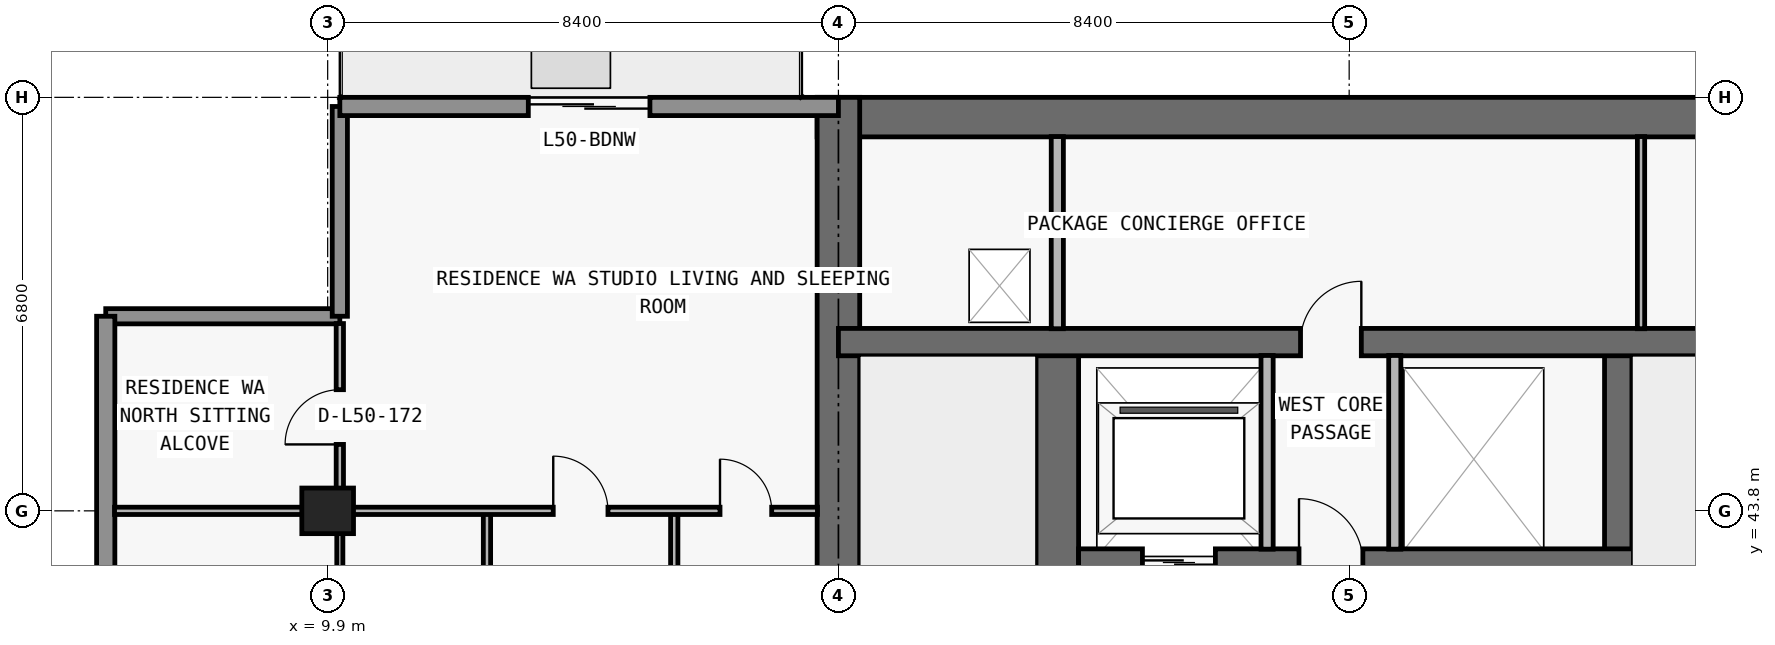
"""IFC4 building model, lengths in metres.
Left out: names, types, materials, properties, quantities, classifications, styles, units other than length and angle.
Written with IfcOpenShell. Run it as: python <this file> out.ifc"""

import sys

from ifc_helpers import new_model, si_unit, direction, frame, frame_2d, origin, origin_2d, place, context, subcontext, project, spatial, rectangle, extrude, element, fill, save


model = new_model("IFC4")
c1 = context("Model", 3, precision=1e-05, world=origin(), true_north=direction((0.0, 1.0)))
c2 = subcontext(c1, "Body", "Model", "MODEL_VIEW")
j1 = project(units=[si_unit("LENGTHUNIT", "METRE"), si_unit("PLANEANGLEUNIT", "RADIAN")], contexts=[c1])
p1 = place(None, origin())
s1 = spatial("IfcSite", under=j1, at=p1, CompositionType="ELEMENT")
p2 = place(p1, origin())
s2 = spatial("IfcBuilding", under=s1, at=p2, CompositionType="ELEMENT")
p3 = place(p2, frame((0.0, 0.0, 180.3)))
s3 = spatial("IfcBuildingStorey", under=s2, at=p3, CompositionType="ELEMENT", Elevation=180.3)
p4 = place(p3, frame((9.9, 43.8, 0.0), z_axis=(0.0, 0.0, 1.0), x_axis=(1.0, 0.0, 0.0)))
e1 = element("IfcColumn", 1, at=p4, inside=s3, PredefinedType="COLUMN", context=c2, shape_type="SweptSolid", body=[
    extrude(rectangle(XDim=0.85, YDim=0.75, at=origin_2d()), origin(), (0.0, 0.0, 1.0), 3.0),
])
p5 = place(p3, frame((17.95, 50.275, 0.0), z_axis=(0.0, 0.0, 1.0), x_axis=(1.0, 0.0, 0.0)))
e2 = element("IfcWall", 2, at=p5, inside=s3, PredefinedType="SHEAR", context=c2, shape_type="SweptSolid", body=[
    extrude(rectangle(XDim=41.9, YDim=0.65, at=frame_2d((20.95, 0.0))), origin(), (0.0, 0.0, 1.0), 3.0),
])
p6 = place(p3, frame((18.3, 36.65, 0.0), z_axis=(0.0, 0.0, 1.0), x_axis=(0.0, 1.0, 0.0)))
e3 = element("IfcWall", 3, at=p6, inside=s3, PredefinedType="SHEAR", context=c2, shape_type="SweptSolid", body=[
    extrude(rectangle(XDim=13.95, YDim=0.7, at=frame_2d((6.975, 0.0))), origin(), (0.0, 0.0, 1.0), 3.0),
])
p7 = place(p3, frame((21.9, 37.0, 0.0), z_axis=(0.0, 0.0, 1.0), x_axis=(0.0, 1.0, 0.0)))
e4 = element("IfcWall", 4, at=p7, inside=s3, PredefinedType="SHEAR", context=c2, shape_type="SweptSolid", body=[
    extrude(rectangle(XDim=9.575, YDim=0.7, at=frame_2d((4.788, 0.0))), origin(), (0.0, 0.0, 1.0), 3.0),
])
p8 = place(p7, frame((0.55, 0.0, 0.0)))
e5 = element("IfcOpeningElement", 5, at=p8, cuts=e4, PredefinedType="OPENING", context=c2, shape_type="SweptSolid", body=[
    extrude(rectangle(XDim=1.1, YDim=2.15, at=frame_2d((0.55, 1.075))), frame((0.0, 0.36, 0.0), z_axis=(0.0, -1.0, 0.0), x_axis=(1.0, 0.0, 0.0)), (0.0, 0.0, 1.0), 0.72),
])
p9 = place(p3, frame((31.125, 37.0, 0.0), z_axis=(0.0, 0.0, 1.0), x_axis=(0.0, 1.0, 0.0)))
e6 = element("IfcWall", 6, at=p9, inside=s3, PredefinedType="SHEAR", context=c2, shape_type="SweptSolid", body=[
    extrude(rectangle(XDim=9.575, YDim=0.45, at=frame_2d((4.788, 0.0))), origin(), (0.0, 0.0, 1.0), 3.0),
])
p10 = place(p3, frame((22.25, 42.95, 0.0), z_axis=(0.0, 0.0, 1.0), x_axis=(1.0, 0.0, 0.0)))
e7 = element("IfcWall", 7, at=p10, inside=s3, PredefinedType="SHEAR", context=c2, shape_type="SweptSolid", body=[
    extrude(rectangle(XDim=33.3, YDim=0.45, at=frame_2d((16.65, 0.0))), origin(), (0.0, 0.0, 1.0), 3.0),
])
p11 = place(p10, frame((1.05, 0.0, 0.0)))
e8 = element("IfcOpeningElement", 8, at=p11, cuts=e7, PredefinedType="OPENING", context=c2, shape_type="SweptSolid", body=[
    extrude(rectangle(XDim=1.2, YDim=2.2, at=frame_2d((0.6, 1.1))), frame((0.0, 0.235, 0.0), z_axis=(0.0, -1.0, 0.0), x_axis=(1.0, 0.0, 0.0)), (0.0, 0.0, 1.0), 0.47),
])
p12 = place(p10, frame((31.05, 0.0, 0.0)))
e9 = element("IfcOpeningElement", 9, at=p12, cuts=e7, PredefinedType="OPENING", context=c2, shape_type="SweptSolid", body=[
    extrude(rectangle(XDim=1.2, YDim=2.2, at=frame_2d((0.6, 1.1))), frame((0.0, 0.235, 0.0), z_axis=(0.0, -1.0, 0.0), x_axis=(1.0, 0.0, 0.0)), (0.0, 0.0, 1.0), 0.47),
])
p13 = place(p10, frame((21.4, 0.0, 0.0)))
e10 = element("IfcOpeningElement", 10, at=p13, cuts=e7, PredefinedType="OPENING", context=c2, shape_type="SweptSolid", body=[
    extrude(rectangle(XDim=1.1, YDim=2.2, at=frame_2d((0.55, 1.1))), frame((0.0, 0.235, 0.0), z_axis=(0.0, -1.0, 0.0), x_axis=(1.0, 0.0, 0.0)), (0.0, 0.0, 1.0), 0.47),
])
p14 = place(p10, frame((24.0, 0.0, 0.0)))
e11 = element("IfcOpeningElement", 11, at=p14, cuts=e7, PredefinedType="OPENING", context=c2, shape_type="SweptSolid", body=[
    extrude(rectangle(XDim=1.1, YDim=2.2, at=frame_2d((0.55, 1.1))), frame((0.0, 0.235, 0.0), z_axis=(0.0, -1.0, 0.0), x_axis=(1.0, 0.0, 0.0)), (0.0, 0.0, 1.0), 0.47),
])
p15 = place(p10, frame((3.625, 0.0, 0.0)))
e12 = element("IfcOpeningElement", 12, at=p15, cuts=e7, PredefinedType="OPENING", context=c2, shape_type="SweptSolid", body=[
    extrude(rectangle(XDim=1.05, YDim=2.15, at=frame_2d((0.525, 1.075))), frame((0.0, 0.235, 0.0), z_axis=(0.0, -1.0, 0.0), x_axis=(1.0, 0.0, 0.0)), (0.0, 0.0, 1.0), 0.47),
])
p16 = place(p10, frame((28.675, 0.0, 0.0)))
e13 = element("IfcOpeningElement", 13, at=p16, cuts=e7, PredefinedType="OPENING", context=c2, shape_type="SweptSolid", body=[
    extrude(rectangle(XDim=1.05, YDim=2.15, at=frame_2d((0.525, 1.075))), frame((0.0, 0.235, 0.0), z_axis=(0.0, -1.0, 0.0), x_axis=(1.0, 0.0, 0.0)), (0.0, 0.0, 1.0), 0.47),
])
p17 = place(p10, frame((15.975, 0.0, 0.0)))
e14 = element("IfcOpeningElement", 14, at=p17, cuts=e7, PredefinedType="OPENING", context=c2, shape_type="SweptSolid", body=[
    extrude(rectangle(XDim=1.0, YDim=2.2, at=frame_2d((0.5, 1.1))), frame((0.0, 0.235, 0.0), z_axis=(0.0, -1.0, 0.0), x_axis=(1.0, 0.0, 0.0)), (0.0, 0.0, 1.0), 0.47),
])
p18 = place(p3, frame((18.3, 46.575, 0.0), z_axis=(0.0, 0.0, 1.0), x_axis=(1.0, 0.0, 0.0)))
e15 = element("IfcWall", 15, at=p18, inside=s3, PredefinedType="SHEAR", context=c2, shape_type="SweptSolid", body=[
    extrude(rectangle(XDim=41.2, YDim=0.45, at=frame_2d((20.6, 0.0))), origin(), (0.0, 0.0, 1.0), 3.0),
])
p19 = place(p18, frame((7.6, 0.0, 0.0)))
e16 = element("IfcOpeningElement", 16, at=p19, cuts=e15, PredefinedType="OPENING", context=c2, shape_type="SweptSolid", body=[
    extrude(rectangle(XDim=1.0, YDim=2.2, at=frame_2d((0.5, 1.1))), frame((0.0, 0.235, 0.0), z_axis=(0.0, -1.0, 0.0), x_axis=(1.0, 0.0, 0.0)), (0.0, 0.0, 1.0), 0.47),
])
p20 = place(p18, frame((32.625, 0.0, 0.0)))
e17 = element("IfcOpeningElement", 17, at=p20, cuts=e15, PredefinedType="OPENING", context=c2, shape_type="SweptSolid", body=[
    extrude(rectangle(XDim=1.05, YDim=2.15, at=frame_2d((0.525, 1.075))), frame((0.0, 0.235, 0.0), z_axis=(0.0, -1.0, 0.0), x_axis=(1.0, 0.0, 0.0)), (0.0, 0.0, 1.0), 0.47),
])
p21 = place(p3, frame((6.25, 47.0, 0.0), z_axis=(0.0, 0.0, 1.0), x_axis=(1.0, 0.0, 0.0)))
e18 = element("IfcWall", 18, at=p21, inside=s3, PredefinedType="ELEMENTEDWALL", context=c2, shape_type="SweptSolid", body=[
    extrude(rectangle(XDim=3.85, YDim=0.25, at=frame_2d((1.925, 0.0))), origin(), (0.0, 0.0, 1.0), 3.0),
])
p22 = place(p3, frame((10.1, 47.0, 0.0), z_axis=(0.0, 0.0, 1.0), x_axis=(0.0, 1.0, 0.0)))
e19 = element("IfcWall", 19, at=p22, inside=s3, PredefinedType="ELEMENTEDWALL", context=c2, shape_type="SweptSolid", body=[
    extrude(rectangle(XDim=3.45, YDim=0.25, at=frame_2d((1.725, 0.0))), origin(), (0.0, 0.0, 1.0), 3.0),
])
p23 = place(p3, frame((6.25, 29.1, 0.0), z_axis=(0.0, 0.0, 1.0), x_axis=(0.0, 1.0, 0.0)))
e20 = element("IfcWall", 20, at=p23, inside=s3, PredefinedType="STANDARD", context=c2, shape_type="SweptSolid", body=[
    extrude(rectangle(XDim=17.9, YDim=0.3, at=frame_2d((8.95, 0.0))), origin(), (0.0, 0.0, 1.0), 3.0),
])
p24 = place(p3, frame((10.1, 50.45, 0.0), z_axis=(0.0, 0.0, 1.0), x_axis=(1.0, 0.0, 0.0)))
e21 = element("IfcWall", 21, at=p24, inside=s3, PredefinedType="STANDARD", context=c2, shape_type="SweptSolid", body=[
    extrude(rectangle(XDim=8.2, YDim=0.3, at=frame_2d((4.1, 0.0))), origin(), (0.0, 0.0, 1.0), 3.0),
])
p25 = place(p24, frame((3.1, 0.0, 0.0)))
e22 = element("IfcOpeningElement", 22, at=p25, cuts=e21, PredefinedType="OPENING", context=c2, shape_type="SweptSolid", body=[
    extrude(rectangle(XDim=2.0, YDim=2.3, at=frame_2d((1.0, 1.15))), frame((0.0, 0.16, 0.0), z_axis=(0.0, -1.0, 0.0), x_axis=(1.0, 0.0, 0.0)), (0.0, 0.0, 1.0), 0.32),
])
p26 = place(p3, frame((10.1, 37.0, 0.0), z_axis=(0.0, 0.0, 1.0), x_axis=(0.0, 1.0, 0.0)))
e23 = element("IfcWall", 23, at=p26, inside=s3, PredefinedType="MOVABLE", context=c2, shape_type="SweptSolid", body=[
    extrude(rectangle(XDim=6.8, YDim=0.1, at=frame_2d((3.4, 0.0))), origin(), (0.0, 0.0, 1.0), 2.213),
])
p27 = place(p26, frame((2.95, 0.0, 0.0)))
e24 = element("IfcOpeningElement", 24, at=p27, cuts=e23, PredefinedType="OPENING", context=c2, shape_type="SweptSolid", body=[
    extrude(rectangle(XDim=0.9, YDim=2.15, at=frame_2d((0.45, 1.075))), frame((0.0, 0.06, 0.0), z_axis=(0.0, -1.0, 0.0), x_axis=(1.0, 0.0, 0.0)), (0.0, 0.0, 1.0), 0.12),
])
p28 = place(p3, frame((10.1, 43.805, 0.0), z_axis=(0.0, 0.0, 1.0), x_axis=(0.0, 1.0, 0.0)))
e25 = element("IfcWall", 25, at=p28, inside=s3, PredefinedType="PARTITIONING", context=c2, shape_type="SweptSolid", body=[
    extrude(rectangle(XDim=3.075, YDim=0.12, at=frame_2d((1.538, 0.0))), origin(), (0.0, 0.0, 1.0), 3.0),
])
p29 = place(p28, frame((1.087, 0.0, 0.0)))
e26 = element("IfcOpeningElement", 26, at=p29, cuts=e25, PredefinedType="OPENING", context=c2, shape_type="SweptSolid", body=[
    extrude(rectangle(XDim=0.9, YDim=2.15, at=frame_2d((0.45, 1.075))), frame((0.0, 0.07, 0.0), z_axis=(0.0, -1.0, 0.0), x_axis=(1.0, 0.0, 0.0)), (0.0, 0.0, 1.0), 0.14),
])
p30 = place(p3, frame((12.52, 37.0, 0.0), z_axis=(0.0, 0.0, 1.0), x_axis=(0.0, 1.0, 0.0)))
e27 = element("IfcWall", 27, at=p30, inside=s3, PredefinedType="PARTITIONING", context=c2, shape_type="SweptSolid", body=[
    extrude(rectangle(XDim=6.8, YDim=0.12, at=frame_2d((3.4, 0.0))), origin(), (0.0, 0.0, 1.0), 3.0),
])
p31 = place(p30, frame((2.95, 0.0, 0.0)))
e28 = element("IfcOpeningElement", 28, at=p31, cuts=e27, PredefinedType="OPENING", context=c2, shape_type="SweptSolid", body=[
    extrude(rectangle(XDim=0.9, YDim=2.15, at=frame_2d((0.45, 1.075))), frame((0.0, 0.07, 0.0), z_axis=(0.0, -1.0, 0.0), x_axis=(1.0, 0.0, 0.0)), (0.0, 0.0, 1.0), 0.14),
])
p32 = place(p3, frame((15.6, 37.0, 0.0), z_axis=(0.0, 0.0, 1.0), x_axis=(0.0, 1.0, 0.0)))
e29 = element("IfcWall", 29, at=p32, inside=s3, PredefinedType="PARTITIONING", context=c2, shape_type="SweptSolid", body=[
    extrude(rectangle(XDim=6.8, YDim=0.12, at=frame_2d((3.4, 0.0))), origin(), (0.0, 0.0, 1.0), 3.0),
])
p33 = place(p32, frame((1.194, 0.0, 0.0)))
e30 = element("IfcOpeningElement", 30, at=p33, cuts=e29, PredefinedType="OPENING", context=c2, shape_type="SweptSolid", body=[
    extrude(rectangle(XDim=0.85, YDim=2.1, at=frame_2d((0.425, 1.05))), frame((0.0, 0.07, 0.0), z_axis=(0.0, -1.0, 0.0), x_axis=(1.0, 0.0, 0.0)), (0.0, 0.0, 1.0), 0.14),
])
p34 = place(p3, frame((21.9, 46.795, 0.0), z_axis=(0.0, 0.0, 1.0), x_axis=(0.0, 1.0, 0.0)))
e31 = element("IfcWall", 31, at=p34, inside=s3, PredefinedType="PARTITIONING", context=c2, shape_type="SweptSolid", body=[
    extrude(rectangle(XDim=3.16, YDim=0.2, at=frame_2d((1.58, 0.0))), origin(), (0.0, 0.0, 1.0), 3.0),
])
for number, where, z_axis, x_axis in (
    (32, (25.35, 43.17, 0.0), (0.0, 0.0, 1.0), (0.0, 1.0, 0.0)),
    (33, (27.45, 43.17, 0.0), (0.0, 0.0, 1.0), (0.0, 1.0, 0.0)),
):
    element("IfcWall", number, at=place(p3, frame(where, z_axis=z_axis, x_axis=x_axis)), inside=s3, PredefinedType="PARTITIONING", context=c2, shape_type="SweptSolid", body=[
        extrude(rectangle(XDim=3.185, YDim=0.2, at=frame_2d((1.593, 0.0))), origin(), (0.0, 0.0, 1.0), 3.0),
    ])
p35 = place(p3, frame((31.5, 46.795, 0.0), z_axis=(0.0, 0.0, 1.0), x_axis=(0.0, 1.0, 0.0)))
e34 = element("IfcWall", 34, at=p35, inside=s3, PredefinedType="PARTITIONING", context=c2, shape_type="SweptSolid", body=[
    extrude(rectangle(XDim=3.16, YDim=0.12, at=frame_2d((1.58, 0.0))), origin(), (0.0, 0.0, 1.0), 3.0),
])
p36 = place(p3, frame((6.395, 43.8, 0.0), z_axis=(0.0, 0.0, 1.0), x_axis=(1.0, 0.0, 0.0)))
e35 = element("IfcWall", 35, at=p36, inside=s3, PredefinedType="PARTITIONING", context=c2, shape_type="SweptSolid", body=[
    extrude(rectangle(XDim=11.56, YDim=0.12, at=frame_2d((5.78, 0.0))), origin(), (0.0, 0.0, 1.0), 2.368),
])
p37 = place(p36, frame((7.215, 0.0, 0.0)))
e36 = element("IfcOpeningElement", 36, at=p37, cuts=e35, PredefinedType="OPENING", context=c2, shape_type="SweptSolid", body=[
    extrude(rectangle(XDim=0.9, YDim=2.15, at=frame_2d((0.45, 1.075))), frame((0.0, 0.07, 0.0), z_axis=(0.0, -1.0, 0.0), x_axis=(1.0, 0.0, 0.0)), (0.0, 0.0, 1.0), 0.14),
])
p38 = place(p36, frame((9.958, 0.0, 0.0)))
e37 = element("IfcOpeningElement", 37, at=p38, cuts=e35, PredefinedType="OPENING", context=c2, shape_type="SweptSolid", body=[
    extrude(rectangle(XDim=0.85, YDim=2.1, at=frame_2d((0.425, 1.05))), frame((0.0, 0.07, 0.0), z_axis=(0.0, -1.0, 0.0), x_axis=(1.0, 0.0, 0.0)), (0.0, 0.0, 1.0), 0.14),
])
p39 = place(p25, origin())
e38 = element("IfcDoor", 38, at=p39, inside=s3, OperationType="DOUBLE_DOOR_SLIDING", PredefinedType="DOOR", context=c2, shape_type="SweptSolid", body=[
    extrude(rectangle(XDim=2.0, YDim=2.3, at=frame_2d((1.0, 1.15))), frame((0.0, 0.025, 0.0), z_axis=(0.0, -1.0, 0.0), x_axis=(1.0, 0.0, 0.0)), (0.0, 0.0, 1.0), 0.05),
])
fill(e22, e38)
p40 = place(p11, origin())
e39 = element("IfcDoor", 39, at=p40, inside=s3, OperationType="DOUBLE_DOOR_SLIDING", PredefinedType="DOOR", context=c2, shape_type="SweptSolid", body=[
    extrude(rectangle(XDim=1.2, YDim=2.2, at=frame_2d((0.6, 1.1))), frame((0.0, 0.025, 0.0), z_axis=(0.0, -1.0, 0.0), x_axis=(1.0, 0.0, 0.0)), (0.0, 0.0, 1.0), 0.05),
])
fill(e8, e39)
p41 = place(p15, origin())
e40 = element("IfcDoor", 40, at=p41, inside=s3, OperationType="SINGLE_SWING_LEFT", PredefinedType="DOOR", context=c2, shape_type="SweptSolid", body=[
    extrude(rectangle(XDim=1.05, YDim=2.15, at=frame_2d((0.525, 1.075))), frame((0.0, 0.025, 0.0), z_axis=(0.0, -1.0, 0.0), x_axis=(1.0, 0.0, 0.0)), (0.0, 0.0, 1.0), 0.05),
])
fill(e12, e40)
p42 = place(p19, origin())
e41 = element("IfcDoor", 41, at=p42, inside=s3, OperationType="SINGLE_SWING_RIGHT", PredefinedType="DOOR", context=c2, shape_type="SweptSolid", body=[
    extrude(rectangle(XDim=1.0, YDim=2.2, at=frame_2d((0.5, 1.1))), frame((0.0, 0.025, 0.0), z_axis=(0.0, -1.0, 0.0), x_axis=(1.0, 0.0, 0.0)), (0.0, 0.0, 1.0), 0.05),
])
fill(e16, e41)
p43 = place(p37, origin())
e42 = element("IfcDoor", 42, at=p43, inside=s3, OperationType="SINGLE_SWING_LEFT", PredefinedType="DOOR", context=c2, shape_type="SweptSolid", body=[
    extrude(rectangle(XDim=0.9, YDim=2.15, at=frame_2d((0.45, 1.075))), frame((0.0, 0.025, 0.0), z_axis=(0.0, -1.0, 0.0), x_axis=(1.0, 0.0, 0.0)), (0.0, 0.0, 1.0), 0.05),
])
fill(e36, e42)
p44 = place(p38, origin())
e43 = element("IfcDoor", 43, at=p44, inside=s3, OperationType="SINGLE_SWING_LEFT", PredefinedType="DOOR", context=c2, shape_type="SweptSolid", body=[
    extrude(rectangle(XDim=0.85, YDim=2.1, at=frame_2d((0.425, 1.05))), frame((0.0, 0.025, 0.0), z_axis=(0.0, -1.0, 0.0), x_axis=(1.0, 0.0, 0.0)), (0.0, 0.0, 1.0), 0.05),
])
fill(e37, e43)
p45 = place(p29, origin())
e44 = element("IfcDoor", 44, at=p45, inside=s3, OperationType="SINGLE_SWING_LEFT", PredefinedType="DOOR", context=c2, shape_type="SweptSolid", body=[
    extrude(rectangle(XDim=0.9, YDim=2.15, at=frame_2d((0.45, 1.075))), frame((0.0, 0.025, 0.0), z_axis=(0.0, -1.0, 0.0), x_axis=(1.0, 0.0, 0.0)), (0.0, 0.0, 1.0), 0.05),
])
fill(e26, e44)
save(model, sys.argv[1])
